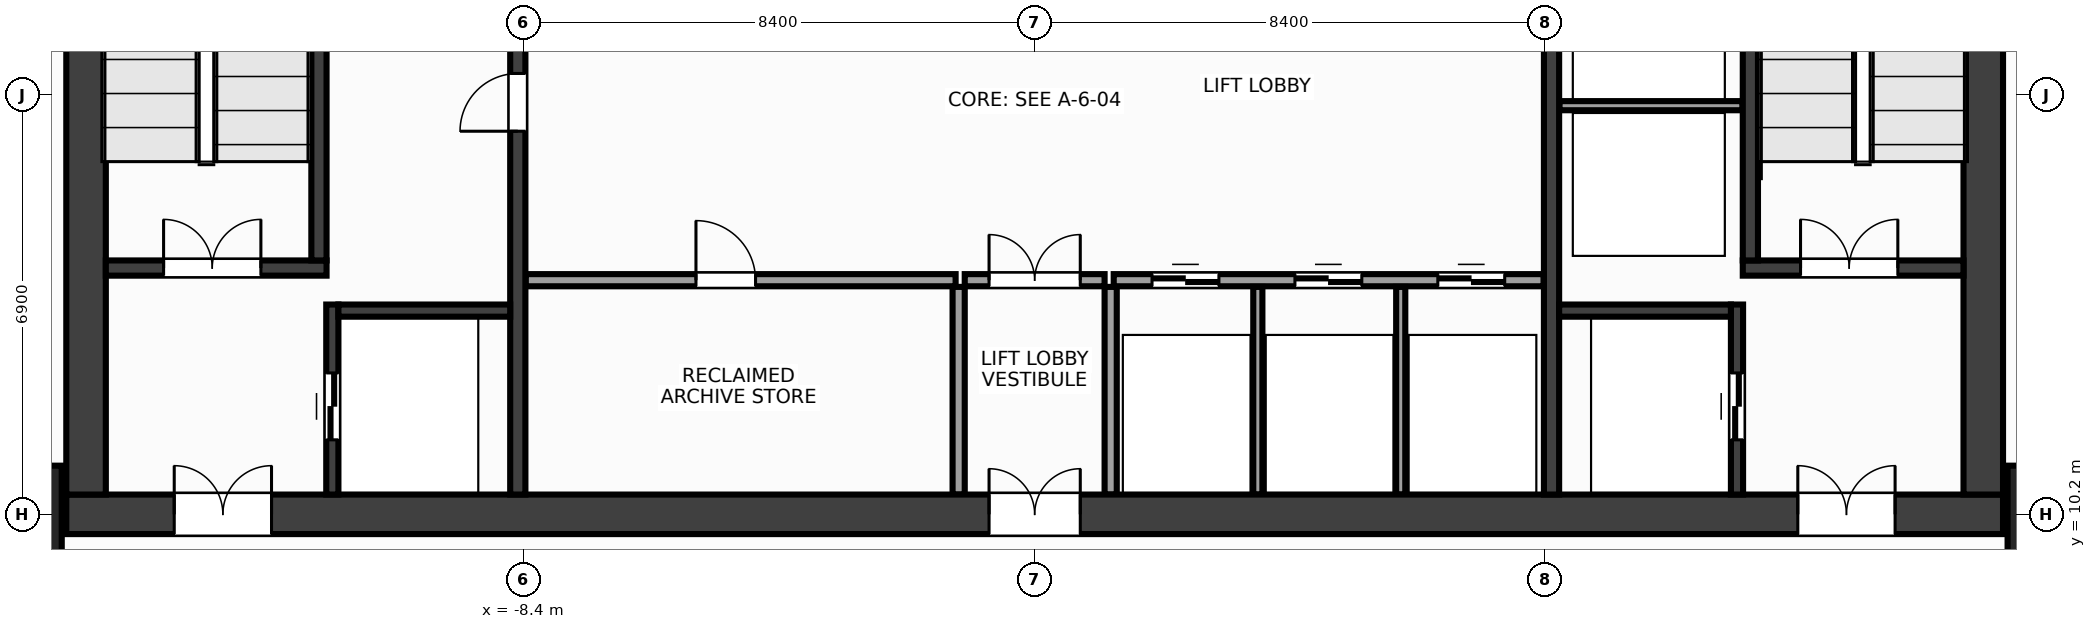
"""IFC4 building model, lengths in metres.
Left out: names, types, materials, properties, quantities, classifications, styles, units other than length and angle.
Written with IfcOpenShell. Run it as: python <this file> out.ifc"""

import sys

from ifc_helpers import new_model, si_unit, direction, frame, frame_2d, origin, origin_2d, place, context, subcontext, project, spatial, rectangle, extrude, source, transform, mapped, element, fill, save


model = new_model("IFC4")
c1 = context("Model", 3, precision=1e-05, world=origin(), true_north=direction((0.0, 1.0)))
c2 = subcontext(c1, "Body", "Model", "MODEL_VIEW")
j1 = project(units=[si_unit("LENGTHUNIT", "METRE"), si_unit("PLANEANGLEUNIT", "RADIAN")], contexts=[c1])
p1 = place(None, origin())
s1 = spatial("IfcSite", under=j1, at=p1, CompositionType="ELEMENT")
p2 = place(p1, origin())
s2 = spatial("IfcBuilding", under=s1, at=p2, CompositionType="ELEMENT")
p3 = place(p2, frame((0.0, 0.0, 88.4)))
s3 = spatial("IfcBuildingStorey", under=s2, at=p3, CompositionType="ELEMENT", Elevation=88.4)
m1 = source(origin(), c2, "Body", "SweptSolid", [
    extrude(rectangle(XDim=31.85, YDim=0.65, at=frame_2d((15.925, 0.0))), origin(), (0.0, 0.0, 1.0), 3.6),
])
p4 = place(p3, frame((-15.925, 10.2, 0.0), z_axis=(0.0, 0.0, 1.0), x_axis=(1.0, 0.0, 0.0)))
e1 = element("IfcWall", 1, at=p4, inside=s3, PredefinedType="SHEAR", context=c2, shape_type="MappedRepresentation", body=[
    mapped(m1, transform((0.0, 0.0, 0.0), x_axis=(1.0, 0.0, 0.0), y_axis=(0.0, 1.0, 0.0), z_axis=(0.0, 0.0, 1.0), scale=1.0)),
])
p5 = place(p4, frame((1.775, 0.0, 0.0)))
e2 = element("IfcOpeningElement", 2, at=p5, cuts=e1, PredefinedType="OPENING", context=c2, shape_type="SweptSolid", body=[
    extrude(rectangle(XDim=1.6, YDim=2.15, at=frame_2d((0.8, 1.075))), frame((0.0, 0.337, 0.0), z_axis=(0.0, -1.0, 0.0), x_axis=(1.0, 0.0, 0.0)), (0.0, 0.0, 1.0), 0.674),
])
p6 = place(p4, frame((28.475, 0.0, 0.0)))
e3 = element("IfcOpeningElement", 3, at=p6, cuts=e1, PredefinedType="OPENING", context=c2, shape_type="SweptSolid", body=[
    extrude(rectangle(XDim=1.6, YDim=2.15, at=frame_2d((0.8, 1.075))), frame((0.0, 0.337, 0.0), z_axis=(0.0, -1.0, 0.0), x_axis=(1.0, 0.0, 0.0)), (0.0, 0.0, 1.0), 0.674),
])
p7 = place(p4, frame((15.175, 0.0, 0.0)))
e4 = element("IfcOpeningElement", 4, at=p7, cuts=e1, PredefinedType="OPENING", context=c2, shape_type="SweptSolid", body=[
    extrude(rectangle(XDim=1.5, YDim=2.2, at=frame_2d((0.75, 1.1))), frame((0.0, 0.337, 0.0), z_axis=(0.0, -1.0, 0.0), x_axis=(1.0, 0.0, 0.0)), (0.0, 0.0, 1.0), 0.674),
])
m2 = source(origin(), c2, "Body", "SweptSolid", [
    extrude(rectangle(XDim=12.95, YDim=0.65, at=frame_2d((6.475, 0.0))), origin(), (0.0, 0.0, 1.0), 3.6),
])
for number, where, z_axis, x_axis in (
    (5, (-15.6, 10.525, 0.0), (0.0, 0.0, 1.0), (0.0, 1.0, 0.0)),
    (6, (15.6, 10.525, 0.0), (0.0, 0.0, 1.0), (0.0, 1.0, 0.0)),
):
    element("IfcWall", number, at=place(p3, frame(where, z_axis=z_axis, x_axis=x_axis)), inside=s3, PredefinedType="SHEAR", context=c2, shape_type="MappedRepresentation", body=[
        mapped(m2, transform((0.0, 0.0, 0.0), x_axis=(1.0, 0.0, 0.0), y_axis=(0.0, 1.0, 0.0), z_axis=(0.0, 0.0, 1.0), scale=1.0)),
    ])
m3 = source(origin(), c2, "Body", "SweptSolid", [
    extrude(rectangle(XDim=12.95, YDim=0.25, at=frame_2d((6.475, 0.0))), origin(), (0.0, 0.0, 1.0), 3.6),
])
p8 = place(p3, frame((-8.5, 10.525, 0.0), z_axis=(0.0, 0.0, 1.0), x_axis=(0.0, 1.0, 0.0)))
e7 = element("IfcWall", 7, at=p8, inside=s3, PredefinedType="SHEAR", context=c2, shape_type="MappedRepresentation", body=[
    mapped(m3, transform((0.0, 0.0, 0.0), x_axis=(1.0, 0.0, 0.0), y_axis=(0.0, 1.0, 0.0), z_axis=(0.0, 0.0, 1.0), scale=1.0)),
])
p9 = place(p8, frame((5.975, 0.0, 0.0)))
e8 = element("IfcOpeningElement", 8, at=p9, cuts=e7, PredefinedType="OPENING", context=c2, shape_type="SweptSolid", body=[
    extrude(rectangle(XDim=0.95, YDim=2.15, at=frame_2d((0.475, 1.075))), frame((0.0, 0.137, 0.0), z_axis=(0.0, -1.0, 0.0), x_axis=(1.0, 0.0, 0.0)), (0.0, 0.0, 1.0), 0.274),
])
p10 = place(p3, frame((8.5, 10.525, 0.0), z_axis=(0.0, 0.0, 1.0), x_axis=(0.0, 1.0, 0.0)))
e9 = element("IfcWall", 9, at=p10, inside=s3, PredefinedType="SHEAR", context=c2, shape_type="MappedRepresentation", body=[
    mapped(m3, transform((0.0, 0.0, 0.0), x_axis=(1.0, 0.0, 0.0), y_axis=(0.0, 1.0, 0.0), z_axis=(0.0, 0.0, 1.0), scale=1.0)),
])
p11 = place(p10, frame((9.925, 0.0, 0.0)))
e10 = element("IfcOpeningElement", 10, at=p11, cuts=e9, PredefinedType="OPENING", context=c2, shape_type="SweptSolid", body=[
    extrude(rectangle(XDim=0.95, YDim=2.15, at=frame_2d((0.475, 1.075))), frame((0.0, 0.137, 0.0), z_axis=(0.0, -1.0, 0.0), x_axis=(1.0, 0.0, 0.0)), (0.0, 0.0, 1.0), 0.274),
])
m4 = source(origin(), c2, "Body", "SweptSolid", [
    extrude(rectangle(XDim=3.63, YDim=0.25, at=frame_2d((1.815, 0.0))), origin(), (0.0, 0.0, 1.0), 3.6),
])
p12 = place(p3, frame((-15.275, 14.25, 0.0), z_axis=(0.0, 0.0, 1.0), x_axis=(1.0, 0.0, 0.0)))
e11 = element("IfcWall", 11, at=p12, inside=s3, PredefinedType="SHEAR", context=c2, shape_type="MappedRepresentation", body=[
    mapped(m4, transform((0.0, 0.0, 0.0), x_axis=(1.0, 0.0, 0.0), y_axis=(0.0, 1.0, 0.0), z_axis=(0.0, 0.0, 1.0), scale=1.0)),
])
p13 = place(p12, frame((0.95, 0.0, 0.0)))
e12 = element("IfcOpeningElement", 12, at=p13, cuts=e11, PredefinedType="OPENING", context=c2, shape_type="SweptSolid", body=[
    extrude(rectangle(XDim=1.6, YDim=2.15, at=frame_2d((0.8, 1.075))), frame((0.0, 0.137, 0.0), z_axis=(0.0, -1.0, 0.0), x_axis=(1.0, 0.0, 0.0)), (0.0, 0.0, 1.0), 0.274),
])
m5 = source(origin(), c2, "Body", "SweptSolid", [
    extrude(rectangle(XDim=9.1, YDim=0.25, at=frame_2d((4.55, 0.0))), origin(), (0.0, 0.0, 1.0), 3.6),
])
p14 = place(p3, frame((-11.77, 14.375, 0.0), z_axis=(0.0, 0.0, 1.0), x_axis=(0.0, 1.0, 0.0)))
e13 = element("IfcWall", 13, at=p14, inside=s3, PredefinedType="SHEAR", context=c2, shape_type="MappedRepresentation", body=[
    mapped(m5, transform((0.0, 0.0, 0.0), x_axis=(1.0, 0.0, 0.0), y_axis=(0.0, 1.0, 0.0), z_axis=(0.0, 0.0, 1.0), scale=1.0)),
])
p15 = place(p3, frame((11.645, 14.25, 0.0), z_axis=(0.0, 0.0, 1.0), x_axis=(1.0, 0.0, 0.0)))
e14 = element("IfcWall", 14, at=p15, inside=s3, PredefinedType="SHEAR", context=c2, shape_type="MappedRepresentation", body=[
    mapped(m4, transform((0.0, 0.0, 0.0), x_axis=(1.0, 0.0, 0.0), y_axis=(0.0, 1.0, 0.0), z_axis=(0.0, 0.0, 1.0), scale=1.0)),
])
p16 = place(p15, frame((0.95, 0.0, 0.0)))
e15 = element("IfcOpeningElement", 15, at=p16, cuts=e14, PredefinedType="OPENING", context=c2, shape_type="SweptSolid", body=[
    extrude(rectangle(XDim=1.6, YDim=2.15, at=frame_2d((0.8, 1.075))), frame((0.0, 0.137, 0.0), z_axis=(0.0, -1.0, 0.0), x_axis=(1.0, 0.0, 0.0)), (0.0, 0.0, 1.0), 0.274),
])
p17 = place(p3, frame((11.77, 14.375, 0.0), z_axis=(0.0, 0.0, 1.0), x_axis=(0.0, 1.0, 0.0)))
e16 = element("IfcWall", 16, at=p17, inside=s3, PredefinedType="SHEAR", context=c2, shape_type="MappedRepresentation", body=[
    mapped(m5, transform((0.0, 0.0, 0.0), x_axis=(1.0, 0.0, 0.0), y_axis=(0.0, 1.0, 0.0), z_axis=(0.0, 0.0, 1.0), scale=1.0)),
])
m6 = source(origin(), c2, "Body", "SweptSolid", [
    extrude(rectangle(XDim=3.125, YDim=0.2, at=frame_2d((1.562, 0.0))), origin(), (0.0, 0.0, 1.0), 3.6),
])
p18 = place(p3, frame((-11.55, 10.525, 0.0), z_axis=(0.0, 0.0, 1.0), x_axis=(0.0, 1.0, 0.0)))
e17 = element("IfcWall", 17, at=p18, inside=s3, PredefinedType="SHEAR", context=c2, shape_type="MappedRepresentation", body=[
    mapped(m6, transform((0.0, 0.0, 0.0), x_axis=(1.0, 0.0, 0.0), y_axis=(0.0, 1.0, 0.0), z_axis=(0.0, 0.0, 1.0), scale=1.0)),
])
p19 = place(p18, frame((0.9, 0.0, 0.0)))
e18 = element("IfcOpeningElement", 18, at=p19, cuts=e17, PredefinedType="OPENING", context=c2, shape_type="SweptSolid", body=[
    extrude(rectangle(XDim=1.1, YDim=2.15, at=frame_2d((0.55, 1.075))), frame((0.0, 0.112, 0.0), z_axis=(0.0, -1.0, 0.0), x_axis=(1.0, 0.0, 0.0)), (0.0, 0.0, 1.0), 0.224),
])
m7 = source(origin(), c2, "Body", "SweptSolid", [
    extrude(rectangle(XDim=2.825, YDim=0.2, at=frame_2d((1.413, 0.0))), origin(), (0.0, 0.0, 1.0), 3.6),
])
p20 = place(p3, frame((-11.45, 13.55, 0.0), z_axis=(0.0, 0.0, 1.0), x_axis=(1.0, 0.0, 0.0)))
e19 = element("IfcWall", 19, at=p20, inside=s3, PredefinedType="SHEAR", context=c2, shape_type="MappedRepresentation", body=[
    mapped(m7, transform((0.0, 0.0, 0.0), x_axis=(1.0, 0.0, 0.0), y_axis=(0.0, 1.0, 0.0), z_axis=(0.0, 0.0, 1.0), scale=1.0)),
])
p21 = place(p3, frame((11.55, 10.525, 0.0), z_axis=(0.0, 0.0, 1.0), x_axis=(0.0, 1.0, 0.0)))
e20 = element("IfcWall", 20, at=p21, inside=s3, PredefinedType="SHEAR", context=c2, shape_type="MappedRepresentation", body=[
    mapped(m6, transform((0.0, 0.0, 0.0), x_axis=(1.0, 0.0, 0.0), y_axis=(0.0, 1.0, 0.0), z_axis=(0.0, 0.0, 1.0), scale=1.0)),
])
p22 = place(p21, frame((0.9, 0.0, 0.0)))
e21 = element("IfcOpeningElement", 21, at=p22, cuts=e20, PredefinedType="OPENING", context=c2, shape_type="SweptSolid", body=[
    extrude(rectangle(XDim=1.1, YDim=2.15, at=frame_2d((0.55, 1.075))), frame((0.0, 0.112, 0.0), z_axis=(0.0, -1.0, 0.0), x_axis=(1.0, 0.0, 0.0)), (0.0, 0.0, 1.0), 0.224),
])
p23 = place(p3, frame((8.625, 13.55, 0.0), z_axis=(0.0, 0.0, 1.0), x_axis=(1.0, 0.0, 0.0)))
e22 = element("IfcWall", 22, at=p23, inside=s3, PredefinedType="SHEAR", context=c2, shape_type="MappedRepresentation", body=[
    mapped(m7, transform((0.0, 0.0, 0.0), x_axis=(1.0, 0.0, 0.0), y_axis=(0.0, 1.0, 0.0), z_axis=(0.0, 0.0, 1.0), scale=1.0)),
])
m8 = source(origin(), c2, "Body", "SweptSolid", [
    extrude(rectangle(XDim=1.6, YDim=1.6, at=origin_2d()), origin(), (0.0, 0.0, 1.0), 3.6),
])
for number, where, z_axis, x_axis in (
    (23, (-16.8, 10.2, 0.0), (0.0, 0.0, 1.0), (1.0, 0.0, 0.0)),
    (24, (16.8, 10.2, 0.0), (0.0, 0.0, 1.0), (1.0, 0.0, 0.0)),
):
    element("IfcColumn", number, at=place(p3, frame(where, z_axis=z_axis, x_axis=x_axis)), inside=s3, PredefinedType="COLUMN", context=c2, shape_type="MappedRepresentation", body=[
        mapped(m8, transform((0.0, 0.0, 0.0), x_axis=(1.0, 0.0, 0.0), y_axis=(0.0, 1.0, 0.0), z_axis=(0.0, 0.0, 1.0), scale=1.0)),
    ])
m9 = source(origin(), c2, "Body", "SweptSolid", [
    extrude(rectangle(XDim=3.01, YDim=0.15, at=frame_2d((1.505, 0.0))), origin(), (0.0, 0.0, 1.0), 3.36),
])
p24 = place(p3, frame((8.63, 16.92, 0.0), z_axis=(0.0, 0.0, 1.0), x_axis=(1.0, 0.0, 0.0)))
e25 = element("IfcWall", 25, at=p24, inside=s3, PredefinedType="PARTITIONING", context=c2, shape_type="MappedRepresentation", body=[
    mapped(m9, transform((0.0, 0.0, 0.0), x_axis=(1.0, 0.0, 0.0), y_axis=(0.0, 1.0, 0.0), z_axis=(0.0, 0.0, 1.0), scale=1.0)),
])
m10 = source(origin(), c2, "Body", "SweptSolid", [
    extrude(rectangle(XDim=7.07, YDim=0.2, at=frame_2d((3.535, 0.0))), origin(), (0.0, 0.0, 1.0), 3.36),
])
p25 = place(p3, frame((-8.37, 14.05, 0.0), z_axis=(0.0, 0.0, 1.0), x_axis=(1.0, 0.0, 0.0)))
e26 = element("IfcWall", 26, at=p25, inside=s3, PredefinedType="PARTITIONING", context=c2, shape_type="MappedRepresentation", body=[
    mapped(m10, transform((0.0, 0.0, 0.0), x_axis=(1.0, 0.0, 0.0), y_axis=(0.0, 1.0, 0.0), z_axis=(0.0, 0.0, 1.0), scale=1.0)),
])
p26 = place(p25, frame((2.8, 0.0, 0.0)))
e27 = element("IfcOpeningElement", 27, at=p26, cuts=e26, PredefinedType="OPENING", context=c2, shape_type="SweptSolid", body=[
    extrude(rectangle(XDim=0.98, YDim=2.15, at=frame_2d((0.49, 1.075))), frame((0.0, 0.112, 0.0), z_axis=(0.0, -1.0, 0.0), x_axis=(1.0, 0.0, 0.0)), (0.0, 0.0, 1.0), 0.224),
])
p27 = place(p3, frame((1.3, 14.05, 0.0), z_axis=(0.0, 0.0, 1.0), x_axis=(1.0, 0.0, 0.0)))
e28 = element("IfcWall", 28, at=p27, inside=s3, PredefinedType="PARTITIONING", context=c2, shape_type="MappedRepresentation", body=[
    mapped(m10, transform((0.0, 0.0, 0.0), x_axis=(1.0, 0.0, 0.0), y_axis=(0.0, 1.0, 0.0), z_axis=(0.0, 0.0, 1.0), scale=1.0)),
])
p28 = place(p27, frame((0.63, 0.0, 0.0)))
e29 = element("IfcOpeningElement", 29, at=p28, cuts=e28, PredefinedType="OPENING", context=c2, shape_type="SweptSolid", body=[
    extrude(rectangle(XDim=1.1, YDim=2.15, at=frame_2d((0.55, 1.075))), frame((0.0, 0.112, 0.0), z_axis=(0.0, -1.0, 0.0), x_axis=(1.0, 0.0, 0.0)), (0.0, 0.0, 1.0), 0.224),
])
p29 = place(p27, frame((2.98, 0.0, 0.0)))
e30 = element("IfcOpeningElement", 30, at=p29, cuts=e28, PredefinedType="OPENING", context=c2, shape_type="SweptSolid", body=[
    extrude(rectangle(XDim=1.1, YDim=2.15, at=frame_2d((0.55, 1.075))), frame((0.0, 0.112, 0.0), z_axis=(0.0, -1.0, 0.0), x_axis=(1.0, 0.0, 0.0)), (0.0, 0.0, 1.0), 0.224),
])
p30 = place(p27, frame((5.33, 0.0, 0.0)))
e31 = element("IfcOpeningElement", 31, at=p30, cuts=e28, PredefinedType="OPENING", context=c2, shape_type="SweptSolid", body=[
    extrude(rectangle(XDim=1.1, YDim=2.15, at=frame_2d((0.55, 1.075))), frame((0.0, 0.112, 0.0), z_axis=(0.0, -1.0, 0.0), x_axis=(1.0, 0.0, 0.0)), (0.0, 0.0, 1.0), 0.224),
])
m11 = source(origin(), c2, "Body", "SweptSolid", [
    extrude(rectangle(XDim=3.415, YDim=0.2, at=frame_2d((1.708, 0.0))), origin(), (0.0, 0.0, 1.0), 3.36),
])
for number, where, z_axis, x_axis in (
    (32, (-1.25, 10.525, 0.0), (0.0, 0.0, 1.0), (0.0, 1.0, 0.0)),
    (33, (1.25, 10.525, 0.0), (0.0, 0.0, 1.0), (0.0, 1.0, 0.0)),
):
    element("IfcWall", number, at=place(p3, frame(where, z_axis=z_axis, x_axis=x_axis)), inside=s3, PredefinedType="PARTITIONING", context=c2, shape_type="MappedRepresentation", body=[
        mapped(m11, transform((0.0, 0.0, 0.0), x_axis=(1.0, 0.0, 0.0), y_axis=(0.0, 1.0, 0.0), z_axis=(0.0, 0.0, 1.0), scale=1.0)),
    ])
m12 = source(origin(), c2, "Body", "SweptSolid", [
    extrude(rectangle(XDim=2.3, YDim=0.2, at=frame_2d((1.15, 0.0))), origin(), (0.0, 0.0, 1.0), 3.36),
])
p31 = place(p3, frame((-1.15, 14.05, 0.0), z_axis=(0.0, 0.0, 1.0), x_axis=(1.0, 0.0, 0.0)))
e34 = element("IfcWall", 34, at=p31, inside=s3, PredefinedType="PARTITIONING", context=c2, shape_type="MappedRepresentation", body=[
    mapped(m12, transform((0.0, 0.0, 0.0), x_axis=(1.0, 0.0, 0.0), y_axis=(0.0, 1.0, 0.0), z_axis=(0.0, 0.0, 1.0), scale=1.0)),
])
p32 = place(p31, frame((0.4, 0.0, 0.0)))
e35 = element("IfcOpeningElement", 35, at=p32, cuts=e34, PredefinedType="OPENING", context=c2, shape_type="SweptSolid", body=[
    extrude(rectangle(XDim=1.5, YDim=2.2, at=frame_2d((0.75, 1.1))), frame((0.0, 0.112, 0.0), z_axis=(0.0, -1.0, 0.0), x_axis=(1.0, 0.0, 0.0)), (0.0, 0.0, 1.0), 0.224),
])
m13 = source(origin(), c2, "Body", "SweptSolid", [
    extrude(rectangle(XDim=3.415, YDim=0.15, at=frame_2d((1.708, 0.0))), origin(), (0.0, 0.0, 1.0), 3.36),
])
for number, where, z_axis, x_axis in (
    (36, (3.67, 10.525, 0.0), (0.0, 0.0, 1.0), (0.0, 1.0, 0.0)),
    (37, (6.02, 10.525, 0.0), (0.0, 0.0, 1.0), (0.0, 1.0, 0.0)),
):
    element("IfcWall", number, at=place(p3, frame(where, z_axis=z_axis, x_axis=x_axis)), inside=s3, PredefinedType="PARTITIONING", context=c2, shape_type="MappedRepresentation", body=[
        mapped(m13, transform((0.0, 0.0, 0.0), x_axis=(1.0, 0.0, 0.0), y_axis=(0.0, 1.0, 0.0), z_axis=(0.0, 0.0, 1.0), scale=1.0)),
    ])
m14 = source(origin(), c2, "Body", "SweptSolid", [
    extrude(rectangle(XDim=1.6, YDim=2.15, at=frame_2d((0.8, 1.075))), frame((0.0, 0.025, 0.0), z_axis=(0.0, -1.0, 0.0), x_axis=(1.0, 0.0, 0.0)), (0.0, 0.0, 1.0), 0.05),
])
p33 = place(p13, origin())
e38 = element("IfcDoor", 38, at=p33, inside=s3, OperationType="DOUBLE_DOOR_SINGLE_SWING", PredefinedType="DOOR", context=c2, shape_type="MappedRepresentation", body=[
    mapped(m14, transform((0.0, 0.0, 0.0), x_axis=(1.0, 0.0, 0.0), y_axis=(0.0, 1.0, 0.0), z_axis=(0.0, 0.0, 1.0), scale=1.0)),
])
fill(e12, e38)
p34 = place(p16, origin())
e39 = element("IfcDoor", 39, at=p34, inside=s3, OperationType="DOUBLE_DOOR_SINGLE_SWING", PredefinedType="DOOR", context=c2, shape_type="MappedRepresentation", body=[
    mapped(m14, transform((0.0, 0.0, 0.0), x_axis=(1.0, 0.0, 0.0), y_axis=(0.0, 1.0, 0.0), z_axis=(0.0, 0.0, 1.0), scale=1.0)),
])
fill(e15, e39)
p35 = place(p5, origin())
e40 = element("IfcDoor", 40, at=p35, inside=s3, OperationType="DOUBLE_DOOR_SINGLE_SWING", PredefinedType="DOOR", context=c2, shape_type="MappedRepresentation", body=[
    mapped(m14, transform((0.0, 0.0, 0.0), x_axis=(1.0, 0.0, 0.0), y_axis=(0.0, 1.0, 0.0), z_axis=(0.0, 0.0, 1.0), scale=1.0)),
])
fill(e2, e40)
p36 = place(p6, origin())
e41 = element("IfcDoor", 41, at=p36, inside=s3, OperationType="DOUBLE_DOOR_SINGLE_SWING", PredefinedType="DOOR", context=c2, shape_type="MappedRepresentation", body=[
    mapped(m14, transform((0.0, 0.0, 0.0), x_axis=(1.0, 0.0, 0.0), y_axis=(0.0, 1.0, 0.0), z_axis=(0.0, 0.0, 1.0), scale=1.0)),
])
fill(e3, e41)
m15 = source(origin(), c2, "Body", "SweptSolid", [
    extrude(rectangle(XDim=1.1, YDim=2.15, at=frame_2d((0.55, 1.075))), frame((0.0, 0.025, 0.0), z_axis=(0.0, -1.0, 0.0), x_axis=(1.0, 0.0, 0.0)), (0.0, 0.0, 1.0), 0.05),
])
p37 = place(p19, origin())
e42 = element("IfcDoor", 42, at=p37, inside=s3, OperationType="DOUBLE_DOOR_SLIDING", PredefinedType="DOOR", context=c2, shape_type="MappedRepresentation", body=[
    mapped(m15, transform((0.0, 0.0, 0.0), x_axis=(1.0, 0.0, 0.0), y_axis=(0.0, 1.0, 0.0), z_axis=(0.0, 0.0, 1.0), scale=1.0)),
])
fill(e18, e42)
p38 = place(p22, origin())
e43 = element("IfcDoor", 43, at=p38, inside=s3, OperationType="DOUBLE_DOOR_SLIDING", PredefinedType="DOOR", context=c2, shape_type="MappedRepresentation", body=[
    mapped(m15, transform((0.0, 0.0, 0.0), x_axis=(1.0, 0.0, 0.0), y_axis=(0.0, 1.0, 0.0), z_axis=(0.0, 0.0, 1.0), scale=1.0)),
])
fill(e21, e43)
m16 = source(origin(), c2, "Body", "SweptSolid", [
    extrude(rectangle(XDim=0.95, YDim=2.15, at=frame_2d((0.475, 1.075))), frame((0.0, 0.025, 0.0), z_axis=(0.0, -1.0, 0.0), x_axis=(1.0, 0.0, 0.0)), (0.0, 0.0, 1.0), 0.05),
])
p39 = place(p9, origin())
e44 = element("IfcDoor", 44, at=p39, inside=s3, OperationType="SINGLE_SWING_LEFT", PredefinedType="DOOR", context=c2, shape_type="MappedRepresentation", body=[
    mapped(m16, transform((0.0, 0.0, 0.0), x_axis=(1.0, 0.0, 0.0), y_axis=(0.0, 1.0, 0.0), z_axis=(0.0, 0.0, 1.0), scale=1.0)),
])
fill(e8, e44)
m17 = source(origin(), c2, "Body", "SweptSolid", [
    extrude(rectangle(XDim=0.98, YDim=2.15, at=frame_2d((0.49, 1.075))), frame((0.0, 0.025, 0.0), z_axis=(0.0, -1.0, 0.0), x_axis=(1.0, 0.0, 0.0)), (0.0, 0.0, 1.0), 0.05),
])
p40 = place(p26, origin())
e45 = element("IfcDoor", 45, at=p40, inside=s3, OperationType="SINGLE_SWING_LEFT", PredefinedType="DOOR", context=c2, shape_type="MappedRepresentation", body=[
    mapped(m17, transform((0.0, 0.0, 0.0), x_axis=(1.0, 0.0, 0.0), y_axis=(0.0, 1.0, 0.0), z_axis=(0.0, 0.0, 1.0), scale=1.0)),
])
fill(e27, e45)
p41 = place(p28, origin())
e46 = element("IfcDoor", 46, at=p41, inside=s3, OperationType="DOUBLE_DOOR_SLIDING", PredefinedType="DOOR", context=c2, shape_type="MappedRepresentation", body=[
    mapped(m15, transform((0.0, 0.0, 0.0), x_axis=(1.0, 0.0, 0.0), y_axis=(0.0, 1.0, 0.0), z_axis=(0.0, 0.0, 1.0), scale=1.0)),
])
fill(e29, e46)
p42 = place(p29, origin())
e47 = element("IfcDoor", 47, at=p42, inside=s3, OperationType="DOUBLE_DOOR_SLIDING", PredefinedType="DOOR", context=c2, shape_type="MappedRepresentation", body=[
    mapped(m15, transform((0.0, 0.0, 0.0), x_axis=(1.0, 0.0, 0.0), y_axis=(0.0, 1.0, 0.0), z_axis=(0.0, 0.0, 1.0), scale=1.0)),
])
fill(e30, e47)
p43 = place(p30, origin())
e48 = element("IfcDoor", 48, at=p43, inside=s3, OperationType="DOUBLE_DOOR_SLIDING", PredefinedType="DOOR", context=c2, shape_type="MappedRepresentation", body=[
    mapped(m15, transform((0.0, 0.0, 0.0), x_axis=(1.0, 0.0, 0.0), y_axis=(0.0, 1.0, 0.0), z_axis=(0.0, 0.0, 1.0), scale=1.0)),
])
fill(e31, e48)
m18 = source(origin(), c2, "Body", "SweptSolid", [
    extrude(rectangle(XDim=1.5, YDim=2.2, at=frame_2d((0.75, 1.1))), frame((0.0, 0.025, 0.0), z_axis=(0.0, -1.0, 0.0), x_axis=(1.0, 0.0, 0.0)), (0.0, 0.0, 1.0), 0.05),
])
p44 = place(p32, origin())
e49 = element("IfcDoor", 49, at=p44, inside=s3, OperationType="DOUBLE_DOOR_SINGLE_SWING", PredefinedType="DOOR", context=c2, shape_type="MappedRepresentation", body=[
    mapped(m18, transform((0.0, 0.0, 0.0), x_axis=(1.0, 0.0, 0.0), y_axis=(0.0, 1.0, 0.0), z_axis=(0.0, 0.0, 1.0), scale=1.0)),
])
fill(e35, e49)
p45 = place(p7, origin())
e50 = element("IfcDoor", 50, at=p45, inside=s3, OperationType="DOUBLE_DOOR_SINGLE_SWING", PredefinedType="DOOR", context=c2, shape_type="MappedRepresentation", body=[
    mapped(m18, transform((0.0, 0.0, 0.0), x_axis=(1.0, 0.0, 0.0), y_axis=(0.0, 1.0, 0.0), z_axis=(0.0, 0.0, 1.0), scale=1.0)),
])
fill(e4, e50)
save(model, sys.argv[1])
